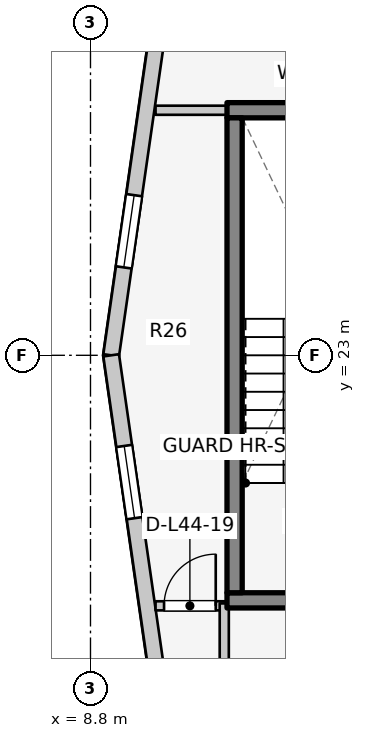
"""IFC4 building model, lengths in metres.
Left out: names, types, materials, properties, quantities, classifications, styles, units other than length and angle.
Written with IfcOpenShell. Run it as: python <this file> out.ifc"""

import sys

from ifc_helpers import new_model, si_unit, direction, frame, frame_2d, origin, place, context, subcontext, project, spatial, rectangle, extrude, element, fill, save


model = new_model("IFC4")
c1 = context("Model", 3, precision=1e-05, world=origin(), true_north=direction((0.0, 1.0)))
c2 = subcontext(c1, "Body", "Model", "MODEL_VIEW")
j1 = project(units=[si_unit("LENGTHUNIT", "METRE"), si_unit("PLANEANGLEUNIT", "RADIAN")], contexts=[c1])
p1 = place(None, origin())
s1 = spatial("IfcSite", under=j1, at=p1, CompositionType="ELEMENT")
p2 = place(p1, origin())
s2 = spatial("IfcBuilding", under=s1, at=p2, CompositionType="ELEMENT")
p3 = place(p2, frame((0.0, 0.0, 146.7)))
s3 = spatial("IfcBuildingStorey", under=s2, at=p3, CompositionType="ELEMENT", Elevation=146.7)
p4 = place(p3, frame((11.045, 18.97, 0.0), z_axis=(0.0, 0.0, 1.0), x_axis=(1.0, 0.0, 0.0)))
e1 = element("IfcWall", 1, at=p4, inside=s3, PredefinedType="SOLIDWALL", context=c2, shape_type="SweptSolid", body=[
    extrude(rectangle(XDim=3.782, YDim=0.25, at=frame_2d((1.891, 0.0))), origin(), (0.0, 0.0, 1.0), 3.1),
])
p5 = place(p4, frame((1.135, 0.0, 0.0)))
e2 = element("IfcOpeningElement", 2, at=p5, cuts=e1, PredefinedType="OPENING", context=c2, shape_type="SweptSolid", body=[
    extrude(rectangle(XDim=1.1, YDim=2.1, at=frame_2d((0.55, 1.05))), frame((0.0, 0.135, 0.0), z_axis=(0.0, -1.0, 0.0), x_axis=(1.0, 0.0, 0.0)), (0.0, 0.0, 1.0), 0.27),
])
p6 = place(p3, frame((11.045, 27.03, 0.0), z_axis=(0.0, 0.0, 1.0), x_axis=(1.0, 0.0, 0.0)))
e3 = element("IfcWall", 3, at=p6, inside=s3, PredefinedType="SOLIDWALL", context=c2, shape_type="SweptSolid", body=[
    extrude(rectangle(XDim=3.782, YDim=0.25, at=frame_2d((1.891, 0.0))), origin(), (0.0, 0.0, 1.0), 3.1),
])
p7 = place(p3, frame((11.17, 19.095, 0.0), z_axis=(0.0, 0.0, 1.0), x_axis=(0.0, 1.0, 0.0)))
e4 = element("IfcWall", 4, at=p7, inside=s3, PredefinedType="SOLIDWALL", context=c2, shape_type="SweptSolid", body=[
    extrude(rectangle(XDim=7.81, YDim=0.25, at=frame_2d((3.905, 0.0))), origin(), (0.0, 0.0, 1.0), 3.1),
])
p8 = place(p3, frame((9.93, 28.497, 0.0), z_axis=(0.0, 0.0, 1.0), x_axis=(-0.142227632286, -0.989833976288, 0.0)))
e5 = element("IfcWall", 5, at=p8, inside=s3, PredefinedType="STANDARD", context=c2, shape_type="SweptSolid", body=[
    extrude(rectangle(XDim=5.553, YDim=0.26, at=frame_2d((2.776, 0.0))), origin(), (0.0, 0.0, 1.0), 2.85),
])
p9 = place(p8, frame((2.892, 0.0, 0.75)))
e6 = element("IfcOpeningElement", 6, at=p9, cuts=e5, PredefinedType="OPENING", context=c2, shape_type="SweptSolid", body=[
    extrude(rectangle(XDim=1.2, YDim=1.5, at=frame_2d((0.6, 0.75))), frame((0.0, 0.14, 0.0), z_axis=(0.0, -1.0, 0.0), x_axis=(1.0, 0.0, 0.0)), (0.0, 0.0, 1.0), 0.28),
])
p10 = place(p3, frame((9.14, 23.0, 0.0), z_axis=(0.0, 0.0, 1.0), x_axis=(0.142227632286, -0.989833976288, 0.0)))
e7 = element("IfcWall", 7, at=p10, inside=s3, PredefinedType="STANDARD", context=c2, shape_type="SweptSolid", body=[
    extrude(rectangle(XDim=5.553, YDim=0.26, at=frame_2d((2.776, 0.0))), origin(), (0.0, 0.0, 1.0), 2.85),
])
p11 = place(p10, frame((1.506, 0.0, 0.75)))
e8 = element("IfcOpeningElement", 8, at=p11, cuts=e7, PredefinedType="OPENING", context=c2, shape_type="SweptSolid", body=[
    extrude(rectangle(XDim=1.2, YDim=1.5, at=frame_2d((0.6, 0.75))), frame((0.0, 0.14, 0.0), z_axis=(0.0, -1.0, 0.0), x_axis=(1.0, 0.0, 0.0)), (0.0, 0.0, 1.0), 0.28),
])
p12 = place(p3, frame((9.87, 27.03, 0.0), z_axis=(0.0, 0.0, 1.0), x_axis=(1.0, 0.0, 0.0)))
e9 = element("IfcWall", 9, at=p12, inside=s3, PredefinedType="PARTITIONING", context=c2, shape_type="SweptSolid", body=[
    extrude(rectangle(XDim=1.17, YDim=0.15, at=frame_2d((0.585, 0.0))), origin(), (0.0, 0.0, 1.0), 2.855),
])
p13 = place(p3, frame((9.87, 18.88, 0.0), z_axis=(0.0, 0.0, 1.0), x_axis=(1.0, 0.0, 0.0)))
e10 = element("IfcWall", 10, at=p13, inside=s3, PredefinedType="PARTITIONING", context=c2, shape_type="SweptSolid", body=[
    extrude(rectangle(XDim=1.17, YDim=0.15, at=frame_2d((0.585, 0.0))), origin(), (0.0, 0.0, 1.0), 2.855),
])
p14 = place(p13, frame((0.14, 0.0, 0.0)))
e11 = element("IfcOpeningElement", 11, at=p14, cuts=e10, PredefinedType="OPENING", context=c2, shape_type="SweptSolid", body=[
    extrude(rectangle(XDim=0.85, YDim=2.05, at=frame_2d((0.425, 1.025))), frame((0.0, 0.085, 0.0), z_axis=(0.0, -1.0, 0.0), x_axis=(1.0, 0.0, 0.0)), (0.0, 0.0, 1.0), 0.17),
])
p15 = place(p3, frame((11.0, 15.91, 0.0), z_axis=(0.0, 0.0, 1.0), x_axis=(0.0, 1.0, 0.0)))
e12 = element("IfcWall", 12, at=p15, inside=s3, PredefinedType="PARTITIONING", context=c2, shape_type="SweptSolid", body=[
    extrude(rectangle(XDim=3.01, YDim=0.15, at=frame_2d((1.505, 0.0))), origin(), (0.0, 0.0, 1.0), 2.855),
])
p16 = place(p9, origin())
e13 = element("IfcWindow", 13, at=p16, inside=s3, PartitioningType="SINGLE_PANEL", PredefinedType="WINDOW", context=c2, shape_type="SweptSolid", body=[
    extrude(rectangle(XDim=1.2, YDim=1.5, at=frame_2d((0.6, 0.75))), frame((0.0, 0.03, 0.0), z_axis=(0.0, -1.0, 0.0), x_axis=(1.0, 0.0, 0.0)), (0.0, 0.0, 1.0), 0.06),
])
fill(e6, e13)
p17 = place(p11, origin())
e14 = element("IfcWindow", 14, at=p17, inside=s3, PartitioningType="SINGLE_PANEL", PredefinedType="WINDOW", context=c2, shape_type="SweptSolid", body=[
    extrude(rectangle(XDim=1.2, YDim=1.5, at=frame_2d((0.6, 0.75))), frame((0.0, 0.03, 0.0), z_axis=(0.0, -1.0, 0.0), x_axis=(1.0, 0.0, 0.0)), (0.0, 0.0, 1.0), 0.06),
])
fill(e8, e14)
p18 = place(p14, origin())
e15 = element("IfcDoor", 15, at=p18, inside=s3, OperationType="SINGLE_SWING_RIGHT", PredefinedType="DOOR", context=c2, shape_type="SweptSolid", body=[
    extrude(rectangle(XDim=0.85, YDim=2.05, at=frame_2d((0.425, 1.025))), frame((0.0, 0.025, 0.0), z_axis=(0.0, -1.0, 0.0), x_axis=(1.0, 0.0, 0.0)), (0.0, 0.0, 1.0), 0.05),
])
fill(e11, e15)
save(model, sys.argv[1])
